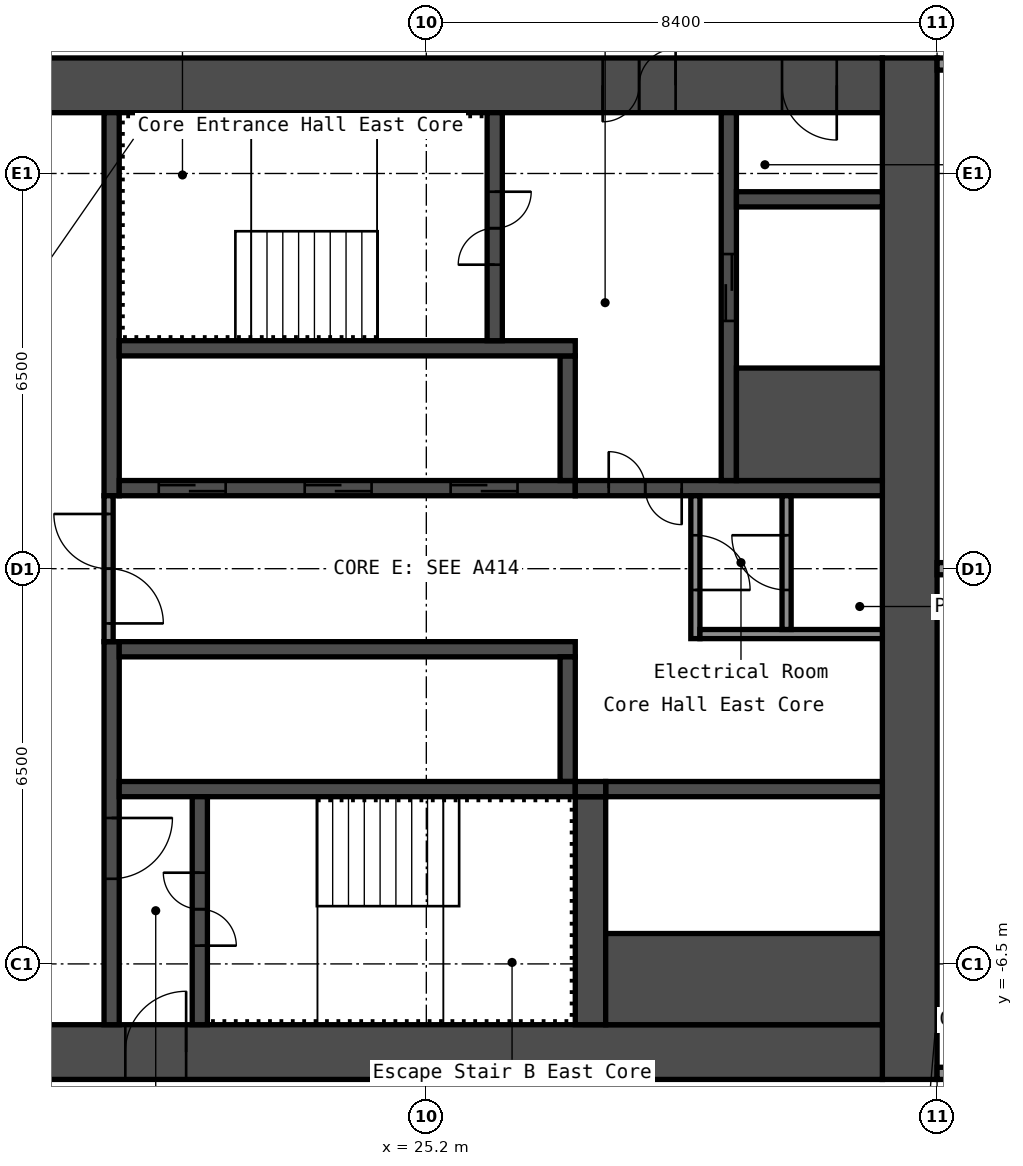
"""IFC4 building model, lengths in metres.
Left out: names, types, materials, properties, quantities, classifications, styles, units other than length and angle.
Written with IfcOpenShell. Run it as: python <this file> out.ifc"""

import sys

from ifc_helpers import new_model, si_unit, direction, frame, frame_2d, origin, place, context, subcontext, project, spatial, rectangle, extrude, element, fill, save


model = new_model("IFC4")
c1 = context("Model", 3, precision=1e-05, world=origin(), true_north=direction((0.0, 1.0)))
c2 = subcontext(c1, "Body", "Model", "MODEL_VIEW")
j1 = project(units=[si_unit("LENGTHUNIT", "METRE"), si_unit("PLANEANGLEUNIT", "RADIAN")], contexts=[c1])
p1 = place(None, origin())
s1 = spatial("IfcSite", under=j1, at=p1, CompositionType="ELEMENT")
p2 = place(p1, origin())
s2 = spatial("IfcBuilding", under=s1, at=p2, CompositionType="ELEMENT")
p3 = place(p2, frame((0.0, 0.0, 97.8)))
s3 = spatial("IfcBuildingStorey", under=s2, at=p3, CompositionType="ELEMENT", Elevation=97.8)
p4 = place(p3, frame((33.15, -8.4, 0.0), z_axis=(0.0, 0.0, 1.0), x_axis=(0.0, 1.0, 0.0)))
e1 = element("IfcWall", 1, at=p4, inside=s3, PredefinedType="SHEAR", context=c2, shape_type="SweptSolid", body=[
    extrude(rectangle(XDim=16.8, YDim=0.9, at=frame_2d((8.4, 0.0))), origin(), (0.0, 0.0, 1.0), 2.8),
])
p5 = place(p3, frame((17.7, 7.95, 0.0), z_axis=(0.0, 0.0, 1.0), x_axis=(1.0, 0.0, 0.0)))
e2 = element("IfcWall", 2, at=p5, inside=s3, PredefinedType="SHEAR", context=c2, shape_type="SweptSolid", body=[
    extrude(rectangle(XDim=15.0, YDim=0.9, at=frame_2d((7.5, 0.0))), origin(), (0.0, 0.0, 1.0), 2.8),
])
p6 = place(p5, frame((10.4, 0.0, 0.0)))
e3 = element("IfcOpeningElement", 3, at=p6, cuts=e2, PredefinedType="OPENING", context=c2, shape_type="SweptSolid", body=[
    extrude(rectangle(XDim=1.2, YDim=2.1, at=frame_2d((0.6, 1.05))), frame((0.0, 0.46, 0.0), z_axis=(0.0, -1.0, 0.0), x_axis=(1.0, 0.0, 0.0)), (0.0, 0.0, 1.0), 0.92),
])
p7 = place(p5, frame((13.35, 0.0, 0.0)))
e4 = element("IfcOpeningElement", 4, at=p7, cuts=e2, PredefinedType="OPENING", context=c2, shape_type="SweptSolid", body=[
    extrude(rectangle(XDim=0.9, YDim=2.1, at=frame_2d((0.45, 1.05))), frame((0.0, 0.46, 0.0), z_axis=(0.0, -1.0, 0.0), x_axis=(1.0, 0.0, 0.0)), (0.0, 0.0, 1.0), 0.92),
])
p8 = place(p3, frame((17.7, -7.95, 0.0), z_axis=(0.0, 0.0, 1.0), x_axis=(1.0, 0.0, 0.0)))
e5 = element("IfcWall", 5, at=p8, inside=s3, PredefinedType="SHEAR", context=c2, shape_type="SweptSolid", body=[
    extrude(rectangle(XDim=15.0, YDim=0.9, at=frame_2d((7.5, 0.0))), origin(), (0.0, 0.0, 1.0), 2.8),
])
p9 = place(p8, frame((2.55, 0.0, 0.0)))
e6 = element("IfcOpeningElement", 6, at=p9, cuts=e5, PredefinedType="OPENING", context=c2, shape_type="SweptSolid", body=[
    extrude(rectangle(XDim=1.0, YDim=2.1, at=frame_2d((0.5, 1.05))), frame((0.0, 0.46, 0.0), z_axis=(0.0, -1.0, 0.0), x_axis=(1.0, 0.0, 0.0)), (0.0, 0.0, 1.0), 0.92),
])
p10 = place(p3, frame((20.025, 1.2, 0.0), z_axis=(0.0, 0.0, 1.0), x_axis=(0.0, 1.0, 0.0)))
e7 = element("IfcWall", 7, at=p10, inside=s3, PredefinedType="SHEAR", context=c2, shape_type="SweptSolid", body=[
    extrude(rectangle(XDim=6.3, YDim=0.25, at=frame_2d((3.15, 0.0))), origin(), (0.0, 0.0, 1.0), 2.8),
])
p11 = place(p3, frame((20.025, -7.5, 0.0), z_axis=(0.0, 0.0, 1.0), x_axis=(0.0, 1.0, 0.0)))
e8 = element("IfcWall", 8, at=p11, inside=s3, PredefinedType="SHEAR", context=c2, shape_type="SweptSolid", body=[
    extrude(rectangle(XDim=6.3, YDim=0.25, at=frame_2d((3.15, 0.0))), origin(), (0.0, 0.0, 1.0), 2.8),
])
p12 = place(p11, frame((2.4, 0.0, 0.0)))
e9 = element("IfcOpeningElement", 9, at=p12, cuts=e8, PredefinedType="OPENING", context=c2, shape_type="SweptSolid", body=[
    extrude(rectangle(XDim=1.0, YDim=2.1, at=frame_2d((0.5, 1.05))), frame((0.0, 0.135, 0.0), z_axis=(0.0, -1.0, 0.0), x_axis=(1.0, 0.0, 0.0)), (0.0, 0.0, 1.0), 0.27),
])
p13 = place(p3, frame((20.15, 1.325, 0.0), z_axis=(0.0, 0.0, 1.0), x_axis=(1.0, 0.0, 0.0)))
e10 = element("IfcWall", 10, at=p13, inside=s3, PredefinedType="SHEAR", context=c2, shape_type="SweptSolid", body=[
    extrude(rectangle(XDim=7.5, YDim=0.25, at=frame_2d((3.75, 0.0))), origin(), (0.0, 0.0, 1.0), 2.8),
])
p14 = place(p13, frame((0.65, 0.0, 0.0)))
e11 = element("IfcOpeningElement", 11, at=p14, cuts=e10, PredefinedType="OPENING", context=c2, shape_type="SweptSolid", body=[
    extrude(rectangle(XDim=1.1, YDim=2.1, at=frame_2d((0.55, 1.05))), frame((0.0, 0.135, 0.0), z_axis=(0.0, -1.0, 0.0), x_axis=(1.0, 0.0, 0.0)), (0.0, 0.0, 1.0), 0.27),
])
p15 = place(p13, frame((3.05, 0.0, 0.0)))
e12 = element("IfcOpeningElement", 12, at=p15, cuts=e10, PredefinedType="OPENING", context=c2, shape_type="SweptSolid", body=[
    extrude(rectangle(XDim=1.1, YDim=2.1, at=frame_2d((0.55, 1.05))), frame((0.0, 0.135, 0.0), z_axis=(0.0, -1.0, 0.0), x_axis=(1.0, 0.0, 0.0)), (0.0, 0.0, 1.0), 0.27),
])
p16 = place(p13, frame((5.45, 0.0, 0.0)))
e13 = element("IfcOpeningElement", 13, at=p16, cuts=e10, PredefinedType="OPENING", context=c2, shape_type="SweptSolid", body=[
    extrude(rectangle(XDim=1.1, YDim=2.1, at=frame_2d((0.55, 1.05))), frame((0.0, 0.135, 0.0), z_axis=(0.0, -1.0, 0.0), x_axis=(1.0, 0.0, 0.0)), (0.0, 0.0, 1.0), 0.27),
])
p17 = place(p3, frame((27.525, 1.45, 0.0), z_axis=(0.0, 0.0, 1.0), x_axis=(0.0, 1.0, 0.0)))
e14 = element("IfcWall", 14, at=p17, inside=s3, PredefinedType="SHEAR", context=c2, shape_type="SweptSolid", body=[
    extrude(rectangle(XDim=2.05, YDim=0.25, at=frame_2d((1.025, 0.0))), origin(), (0.0, 0.0, 1.0), 2.8),
])
p18 = place(p3, frame((20.15, 3.625, 0.0), z_axis=(0.0, 0.0, 1.0), x_axis=(1.0, 0.0, 0.0)))
e15 = element("IfcWall", 15, at=p18, inside=s3, PredefinedType="SHEAR", context=c2, shape_type="SweptSolid", body=[
    extrude(rectangle(XDim=7.5, YDim=0.25, at=frame_2d((3.75, 0.0))), origin(), (0.0, 0.0, 1.0), 2.8),
])
p19 = place(p3, frame((26.325, 3.75, 0.0), z_axis=(0.0, 0.0, 1.0), x_axis=(0.0, 1.0, 0.0)))
e16 = element("IfcWall", 16, at=p19, inside=s3, PredefinedType="SHEAR", context=c2, shape_type="SweptSolid", body=[
    extrude(rectangle(XDim=3.75, YDim=0.25, at=frame_2d((1.875, 0.0))), origin(), (0.0, 0.0, 1.0), 2.8),
])
p20 = place(p19, frame((1.25, 0.0, 0.0)))
e17 = element("IfcOpeningElement", 17, at=p20, cuts=e16, PredefinedType="OPENING", context=c2, shape_type="SweptSolid", body=[
    extrude(rectangle(XDim=1.2, YDim=2.1, at=frame_2d((0.6, 1.05))), frame((0.0, 0.135, 0.0), z_axis=(0.0, -1.0, 0.0), x_axis=(1.0, 0.0, 0.0)), (0.0, 0.0, 1.0), 0.27),
])
p21 = place(p3, frame((27.65, 1.325, 0.0), z_axis=(0.0, 0.0, 1.0), x_axis=(1.0, 0.0, 0.0)))
e18 = element("IfcWall", 18, at=p21, inside=s3, PredefinedType="SHEAR", context=c2, shape_type="SweptSolid", body=[
    extrude(rectangle(XDim=5.05, YDim=0.25, at=frame_2d((2.525, 0.0))), origin(), (0.0, 0.0, 1.0), 2.8),
])
p22 = place(p21, frame((0.55, 0.0, 0.0)))
e19 = element("IfcOpeningElement", 19, at=p22, cuts=e18, PredefinedType="OPENING", context=c2, shape_type="SweptSolid", body=[
    extrude(rectangle(XDim=1.2, YDim=2.1, at=frame_2d((0.6, 1.05))), frame((0.0, 0.135, 0.0), z_axis=(0.0, -1.0, 0.0), x_axis=(1.0, 0.0, 0.0)), (0.0, 0.0, 1.0), 0.27),
])
p23 = place(p3, frame((30.175, 1.45, 0.0), z_axis=(0.0, 0.0, 1.0), x_axis=(0.0, 1.0, 0.0)))
e20 = element("IfcWall", 20, at=p23, inside=s3, PredefinedType="SHEAR", context=c2, shape_type="SweptSolid", body=[
    extrude(rectangle(XDim=6.05, YDim=0.25, at=frame_2d((3.025, 0.0))), origin(), (0.0, 0.0, 1.0), 2.8),
])
p24 = place(p23, frame((2.625, 0.0, 0.0)))
e21 = element("IfcOpeningElement", 21, at=p24, cuts=e20, PredefinedType="OPENING", context=c2, shape_type="SweptSolid", body=[
    extrude(rectangle(XDim=1.1, YDim=2.1, at=frame_2d((0.55, 1.05))), frame((0.0, 0.135, 0.0), z_axis=(0.0, -1.0, 0.0), x_axis=(1.0, 0.0, 0.0)), (0.0, 0.0, 1.0), 0.27),
])
p25 = place(p3, frame((30.3, 2.375, 0.0), z_axis=(0.0, 0.0, 1.0), x_axis=(1.0, 0.0, 0.0)))
e22 = element("IfcWall", 22, at=p25, inside=s3, PredefinedType="SHEAR", context=c2, shape_type="SweptSolid", body=[
    extrude(rectangle(XDim=2.4, YDim=1.85, at=frame_2d((1.2, 0.0))), origin(), (0.0, 0.0, 1.0), 2.8),
])
p26 = place(p3, frame((30.3, 6.075, 0.0), z_axis=(0.0, 0.0, 1.0), x_axis=(1.0, 0.0, 0.0)))
e23 = element("IfcWall", 23, at=p26, inside=s3, PredefinedType="SHEAR", context=c2, shape_type="SweptSolid", body=[
    extrude(rectangle(XDim=2.4, YDim=0.25, at=frame_2d((1.2, 0.0))), origin(), (0.0, 0.0, 1.0), 2.8),
])
p27 = place(p3, frame((20.15, -1.325, 0.0), z_axis=(0.0, 0.0, 1.0), x_axis=(1.0, 0.0, 0.0)))
e24 = element("IfcWall", 24, at=p27, inside=s3, PredefinedType="SHEAR", context=c2, shape_type="SweptSolid", body=[
    extrude(rectangle(XDim=7.5, YDim=0.25, at=frame_2d((3.75, 0.0))), origin(), (0.0, 0.0, 1.0), 2.8),
])
p28 = place(p3, frame((27.525, -3.5, 0.0), z_axis=(0.0, 0.0, 1.0), x_axis=(0.0, 1.0, 0.0)))
e25 = element("IfcWall", 25, at=p28, inside=s3, PredefinedType="SHEAR", context=c2, shape_type="SweptSolid", body=[
    extrude(rectangle(XDim=2.05, YDim=0.25, at=frame_2d((1.025, 0.0))), origin(), (0.0, 0.0, 1.0), 2.8),
])
p29 = place(p3, frame((20.15, -3.625, 0.0), z_axis=(0.0, 0.0, 1.0), x_axis=(1.0, 0.0, 0.0)))
e26 = element("IfcWall", 26, at=p29, inside=s3, PredefinedType="SHEAR", context=c2, shape_type="SweptSolid", body=[
    extrude(rectangle(XDim=7.5, YDim=0.25, at=frame_2d((3.75, 0.0))), origin(), (0.0, 0.0, 1.0), 2.8),
])
p30 = place(p3, frame((21.475, -7.5, 0.0), z_axis=(0.0, 0.0, 1.0), x_axis=(0.0, 1.0, 0.0)))
e27 = element("IfcWall", 27, at=p30, inside=s3, PredefinedType="SHEAR", context=c2, shape_type="SweptSolid", body=[
    extrude(rectangle(XDim=3.75, YDim=0.25, at=frame_2d((1.875, 0.0))), origin(), (0.0, 0.0, 1.0), 2.8),
])
p31 = place(p30, frame((1.3, 0.0, 0.0)))
e28 = element("IfcOpeningElement", 28, at=p31, cuts=e27, PredefinedType="OPENING", context=c2, shape_type="SweptSolid", body=[
    extrude(rectangle(XDim=1.2, YDim=2.1, at=frame_2d((0.6, 1.05))), frame((0.0, 0.135, 0.0), z_axis=(0.0, -1.0, 0.0), x_axis=(1.0, 0.0, 0.0)), (0.0, 0.0, 1.0), 0.27),
])
p32 = place(p3, frame((27.9, -7.5, 0.0), z_axis=(0.0, 0.0, 1.0), x_axis=(0.0, 1.0, 0.0)))
e29 = element("IfcWall", 29, at=p32, inside=s3, PredefinedType="SHEAR", context=c2, shape_type="SweptSolid", body=[
    extrude(rectangle(XDim=3.75, YDim=0.5, at=frame_2d((1.875, 0.0))), origin(), (0.0, 0.0, 1.0), 2.8),
])
p33 = place(p3, frame((28.15, -3.625, 0.0), z_axis=(0.0, 0.0, 1.0), x_axis=(1.0, 0.0, 0.0)))
e30 = element("IfcWall", 30, at=p33, inside=s3, PredefinedType="SHEAR", context=c2, shape_type="SweptSolid", body=[
    extrude(rectangle(XDim=4.55, YDim=0.25, at=frame_2d((2.275, 0.0))), origin(), (0.0, 0.0, 1.0), 2.8),
])
p34 = place(p3, frame((28.15, -6.75, 0.0), z_axis=(0.0, 0.0, 1.0), x_axis=(1.0, 0.0, 0.0)))
e31 = element("IfcWall", 31, at=p34, inside=s3, PredefinedType="SHEAR", context=c2, shape_type="SweptSolid", body=[
    extrude(rectangle(XDim=4.55, YDim=1.5, at=frame_2d((2.275, 0.0))), origin(), (0.0, 0.0, 1.0), 2.8),
])
p35 = place(p3, frame((27.65, -3.625, 0.0), z_axis=(0.0, 0.0, 1.0), x_axis=(1.0, 0.0, 0.0)))
e32 = element("IfcWall", 32, at=p35, inside=s3, PredefinedType="SHEAR", context=c2, shape_type="SweptSolid", body=[
    extrude(rectangle(XDim=0.5, YDim=0.25, at=frame_2d((0.25, 0.0))), origin(), (0.0, 0.0, 1.0), 2.8),
])
p36 = place(p3, frame((19.975, -1.2, 0.0), z_axis=(0.0, 0.0, 1.0), x_axis=(0.0, 1.0, 0.0)))
e33 = element("IfcWall", 33, at=p36, inside=s3, PredefinedType="PARTITIONING", context=c2, shape_type="SweptSolid", body=[
    extrude(rectangle(XDim=2.4, YDim=0.15, at=frame_2d((1.2, 0.0))), origin(), (0.0, 0.0, 1.0), 2.8),
])
p37 = place(p36, frame((0.3, 0.0, 0.0)))
e34 = element("IfcOpeningElement", 34, at=p37, cuts=e33, PredefinedType="OPENING", context=c2, shape_type="SweptSolid", body=[
    extrude(rectangle(XDim=1.8, YDim=2.1, at=frame_2d((0.9, 1.05))), frame((0.0, 0.085, 0.0), z_axis=(0.0, -1.0, 0.0), x_axis=(1.0, 0.0, 0.0)), (0.0, 0.0, 1.0), 0.17),
])
p38 = place(p3, frame((29.625, -1.15, 0.0), z_axis=(0.0, 0.0, 1.0), x_axis=(0.0, 1.0, 0.0)))
e35 = element("IfcWall", 35, at=p38, inside=s3, PredefinedType="PARTITIONING", context=c2, shape_type="SweptSolid", body=[
    extrude(rectangle(XDim=2.35, YDim=0.15, at=frame_2d((1.175, 0.0))), origin(), (0.0, 0.0, 1.0), 2.8),
])
p39 = place(p38, frame((0.8, 0.0, 0.0)))
e36 = element("IfcOpeningElement", 36, at=p39, cuts=e35, PredefinedType="OPENING", context=c2, shape_type="SweptSolid", body=[
    extrude(rectangle(XDim=0.9, YDim=2.1, at=frame_2d((0.45, 1.05))), frame((0.0, 0.085, 0.0), z_axis=(0.0, -1.0, 0.0), x_axis=(1.0, 0.0, 0.0)), (0.0, 0.0, 1.0), 0.17),
])
p40 = place(p3, frame((29.7, -1.075, 0.0), z_axis=(0.0, 0.0, 1.0), x_axis=(1.0, 0.0, 0.0)))
e37 = element("IfcWall", 37, at=p40, inside=s3, PredefinedType="PARTITIONING", context=c2, shape_type="SweptSolid", body=[
    extrude(rectangle(XDim=3.0, YDim=0.15, at=frame_2d((1.5, 0.0))), origin(), (0.0, 0.0, 1.0), 2.8),
])
p41 = place(p3, frame((31.125, -1.0, 0.0), z_axis=(0.0, 0.0, 1.0), x_axis=(0.0, 1.0, 0.0)))
e38 = element("IfcWall", 38, at=p41, inside=s3, PredefinedType="PARTITIONING", context=c2, shape_type="SweptSolid", body=[
    extrude(rectangle(XDim=2.2, YDim=0.15, at=frame_2d((1.1, 0.0))), origin(), (0.0, 0.0, 1.0), 2.8),
])
p42 = place(p41, frame((0.65, 0.0, 0.0)))
e39 = element("IfcOpeningElement", 39, at=p42, cuts=e38, PredefinedType="OPENING", context=c2, shape_type="SweptSolid", body=[
    extrude(rectangle(XDim=0.9, YDim=2.1, at=frame_2d((0.45, 1.05))), frame((0.0, 0.085, 0.0), z_axis=(0.0, -1.0, 0.0), x_axis=(1.0, 0.0, 0.0)), (0.0, 0.0, 1.0), 0.17),
])
p43 = place(p3, frame((33.6, -8.3, 0.0), z_axis=(0.0, 0.0, 1.0), x_axis=(1.0, 0.0, 0.0)))
e40 = element("IfcWall", 40, at=p43, inside=s3, PredefinedType="PARTITIONING", context=c2, shape_type="SweptSolid", body=[
    extrude(rectangle(XDim=10.4, YDim=0.2, at=frame_2d((5.2, 0.0))), origin(), (0.0, 0.0, 1.0), 2.8),
])
p44 = place(p43, frame((3.05, 0.0, 0.0)))
e41 = element("IfcOpeningElement", 41, at=p44, cuts=e40, PredefinedType="OPENING", context=c2, shape_type="SweptSolid", body=[
    extrude(rectangle(XDim=1.0, YDim=2.1, at=frame_2d((0.5, 1.05))), frame((0.0, 0.11, 0.0), z_axis=(0.0, -1.0, 0.0), x_axis=(1.0, 0.0, 0.0)), (0.0, 0.0, 1.0), 0.22),
])
p45 = place(p3, frame((33.6, 0.0, 0.0), z_axis=(0.0, 0.0, 1.0), x_axis=(1.0, 0.0, 0.0)))
e42 = element("IfcWall", 42, at=p45, inside=s3, PredefinedType="PARTITIONING", context=c2, shape_type="SweptSolid", body=[
    extrude(rectangle(XDim=10.3, YDim=0.2, at=frame_2d((5.15, 0.0))), origin(), (0.0, 0.0, 1.0), 2.8),
])
p46 = place(p3, frame((33.6, 8.3, 0.0), z_axis=(0.0, 0.0, 1.0), x_axis=(1.0, 0.0, 0.0)))
e43 = element("IfcWall", 43, at=p46, inside=s3, PredefinedType="PARTITIONING", context=c2, shape_type="SweptSolid", body=[
    extrude(rectangle(XDim=10.4, YDim=0.2, at=frame_2d((5.2, 0.0))), origin(), (0.0, 0.0, 1.0), 2.8),
])
p47 = place(p46, frame((3.05, 0.0, 0.0)))
e44 = element("IfcOpeningElement", 44, at=p47, cuts=e43, PredefinedType="OPENING", context=c2, shape_type="SweptSolid", body=[
    extrude(rectangle(XDim=1.0, YDim=2.1, at=frame_2d((0.5, 1.05))), frame((0.0, 0.11, 0.0), z_axis=(0.0, -1.0, 0.0), x_axis=(1.0, 0.0, 0.0)), (0.0, 0.0, 1.0), 0.22),
])
p48 = place(p6, origin())
e45 = element("IfcDoor", 45, at=p48, inside=s3, OperationType="DOUBLE_DOOR_SINGLE_SWING", PredefinedType="DOOR", context=c2, shape_type="SweptSolid", body=[
    extrude(rectangle(XDim=1.2, YDim=2.1, at=frame_2d((0.6, 1.05))), frame((0.0, 0.025, 0.0), z_axis=(0.0, -1.0, 0.0), x_axis=(1.0, 0.0, 0.0)), (0.0, 0.0, 1.0), 0.05),
])
fill(e3, e45)
p49 = place(p7, origin())
e46 = element("IfcDoor", 46, at=p49, inside=s3, OperationType="SINGLE_SWING_RIGHT", PredefinedType="DOOR", context=c2, shape_type="SweptSolid", body=[
    extrude(rectangle(XDim=0.9, YDim=2.1, at=frame_2d((0.45, 1.05))), frame((0.0, 0.025, 0.0), z_axis=(0.0, -1.0, 0.0), x_axis=(1.0, 0.0, 0.0)), (0.0, 0.0, 1.0), 0.05),
])
fill(e4, e46)
p50 = place(p9, origin())
e47 = element("IfcDoor", 47, at=p50, inside=s3, OperationType="SINGLE_SWING_LEFT", PredefinedType="DOOR", context=c2, shape_type="SweptSolid", body=[
    extrude(rectangle(XDim=1.0, YDim=2.1, at=frame_2d((0.5, 1.05))), frame((0.0, 0.025, 0.0), z_axis=(0.0, -1.0, 0.0), x_axis=(1.0, 0.0, 0.0)), (0.0, 0.0, 1.0), 0.05),
])
fill(e6, e47)
p51 = place(p20, origin())
e48 = element("IfcDoor", 48, at=p51, inside=s3, OperationType="DOUBLE_DOOR_SINGLE_SWING", PredefinedType="DOOR", context=c2, shape_type="SweptSolid", body=[
    extrude(rectangle(XDim=1.2, YDim=2.1, at=frame_2d((0.6, 1.05))), frame((0.0, 0.025, 0.0), z_axis=(0.0, -1.0, 0.0), x_axis=(1.0, 0.0, 0.0)), (0.0, 0.0, 1.0), 0.05),
])
fill(e17, e48)
p52 = place(p31, origin())
e49 = element("IfcDoor", 49, at=p52, inside=s3, OperationType="DOUBLE_DOOR_SINGLE_SWING", PredefinedType="DOOR", context=c2, shape_type="SweptSolid", body=[
    extrude(rectangle(XDim=1.2, YDim=2.1, at=frame_2d((0.6, 1.05))), frame((0.0, 0.025, 0.0), z_axis=(0.0, -1.0, 0.0), x_axis=(1.0, 0.0, 0.0)), (0.0, 0.0, 1.0), 0.05),
])
fill(e28, e49)
p53 = place(p12, origin())
e50 = element("IfcDoor", 50, at=p53, inside=s3, OperationType="SINGLE_SWING_RIGHT", PredefinedType="DOOR", context=c2, shape_type="SweptSolid", body=[
    extrude(rectangle(XDim=1.0, YDim=2.1, at=frame_2d((0.5, 1.05))), frame((0.0, 0.025, 0.0), z_axis=(0.0, -1.0, 0.0), x_axis=(1.0, 0.0, 0.0)), (0.0, 0.0, 1.0), 0.05),
])
fill(e9, e50)
p54 = place(p22, origin())
e51 = element("IfcDoor", 51, at=p54, inside=s3, OperationType="DOUBLE_DOOR_SINGLE_SWING", PredefinedType="DOOR", context=c2, shape_type="SweptSolid", body=[
    extrude(rectangle(XDim=1.2, YDim=2.1, at=frame_2d((0.6, 1.05))), frame((0.0, 0.025, 0.0), z_axis=(0.0, -1.0, 0.0), x_axis=(1.0, 0.0, 0.0)), (0.0, 0.0, 1.0), 0.05),
])
fill(e19, e51)
p55 = place(p37, origin())
e52 = element("IfcDoor", 52, at=p55, inside=s3, OperationType="DOUBLE_DOOR_SINGLE_SWING", PredefinedType="DOOR", context=c2, shape_type="SweptSolid", body=[
    extrude(rectangle(XDim=1.8, YDim=2.1, at=frame_2d((0.9, 1.05))), frame((0.0, 0.025, 0.0), z_axis=(0.0, -1.0, 0.0), x_axis=(1.0, 0.0, 0.0)), (0.0, 0.0, 1.0), 0.05),
])
fill(e34, e52)
p56 = place(p39, origin())
e53 = element("IfcDoor", 53, at=p56, inside=s3, OperationType="SINGLE_SWING_LEFT", PredefinedType="DOOR", context=c2, shape_type="SweptSolid", body=[
    extrude(rectangle(XDim=0.9, YDim=2.1, at=frame_2d((0.45, 1.05))), frame((0.0, 0.025, 0.0), z_axis=(0.0, -1.0, 0.0), x_axis=(1.0, 0.0, 0.0)), (0.0, 0.0, 1.0), 0.05),
])
fill(e36, e53)
p57 = place(p42, origin())
e54 = element("IfcDoor", 54, at=p57, inside=s3, OperationType="SINGLE_SWING_LEFT", PredefinedType="DOOR", context=c2, shape_type="SweptSolid", body=[
    extrude(rectangle(XDim=0.9, YDim=2.1, at=frame_2d((0.45, 1.05))), frame((0.0, 0.025, 0.0), z_axis=(0.0, -1.0, 0.0), x_axis=(1.0, 0.0, 0.0)), (0.0, 0.0, 1.0), 0.05),
])
fill(e39, e54)
p58 = place(p14, origin())
e55 = element("IfcDoor", 55, at=p58, inside=s3, OperationType="DOUBLE_DOOR_SLIDING", PredefinedType="DOOR", context=c2, shape_type="SweptSolid", body=[
    extrude(rectangle(XDim=1.1, YDim=2.1, at=frame_2d((0.55, 1.05))), frame((0.0, 0.025, 0.0), z_axis=(0.0, -1.0, 0.0), x_axis=(1.0, 0.0, 0.0)), (0.0, 0.0, 1.0), 0.05),
])
fill(e11, e55)
p59 = place(p15, origin())
e56 = element("IfcDoor", 56, at=p59, inside=s3, OperationType="DOUBLE_DOOR_SLIDING", PredefinedType="DOOR", context=c2, shape_type="SweptSolid", body=[
    extrude(rectangle(XDim=1.1, YDim=2.1, at=frame_2d((0.55, 1.05))), frame((0.0, 0.025, 0.0), z_axis=(0.0, -1.0, 0.0), x_axis=(1.0, 0.0, 0.0)), (0.0, 0.0, 1.0), 0.05),
])
fill(e12, e56)
p60 = place(p16, origin())
e57 = element("IfcDoor", 57, at=p60, inside=s3, OperationType="DOUBLE_DOOR_SLIDING", PredefinedType="DOOR", context=c2, shape_type="SweptSolid", body=[
    extrude(rectangle(XDim=1.1, YDim=2.1, at=frame_2d((0.55, 1.05))), frame((0.0, 0.025, 0.0), z_axis=(0.0, -1.0, 0.0), x_axis=(1.0, 0.0, 0.0)), (0.0, 0.0, 1.0), 0.05),
])
fill(e13, e57)
p61 = place(p24, origin())
e58 = element("IfcDoor", 58, at=p61, inside=s3, OperationType="DOUBLE_DOOR_SLIDING", PredefinedType="DOOR", context=c2, shape_type="SweptSolid", body=[
    extrude(rectangle(XDim=1.1, YDim=2.1, at=frame_2d((0.55, 1.05))), frame((0.0, 0.025, 0.0), z_axis=(0.0, -1.0, 0.0), x_axis=(1.0, 0.0, 0.0)), (0.0, 0.0, 1.0), 0.05),
])
fill(e21, e58)
save(model, sys.argv[1])
